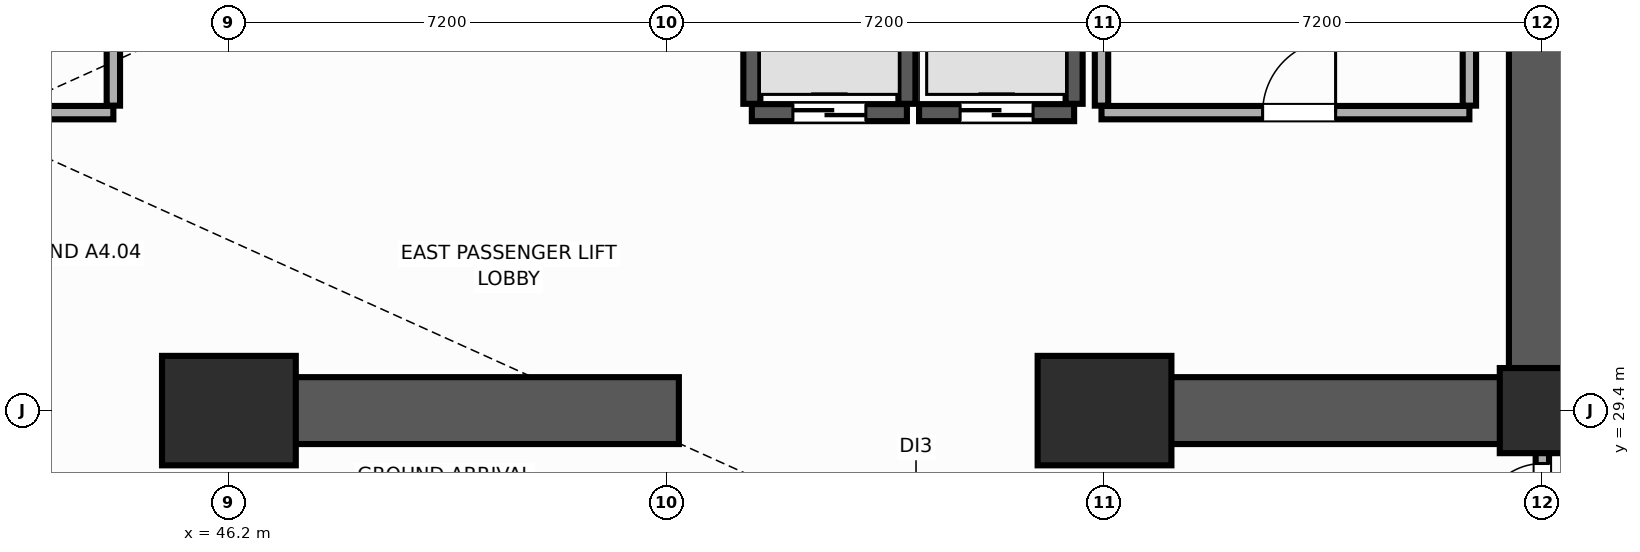
"""IFC4 building model, lengths in metres.
Left out: names, types, materials, properties, quantities, classifications, styles, units other than length and angle.
Written with IfcOpenShell. Run it as: python <this file> out.ifc"""

import sys

from ifc_helpers import new_model, si_unit, direction, frame, frame_2d, origin, origin_2d, place, context, subcontext, project, spatial, rectangle, extrude, element, fill, save


model = new_model("IFC4")
c1 = context("Model", 3, precision=1e-05, world=origin(), true_north=direction((0.0, 1.0)))
c2 = subcontext(c1, "Body", "Model", "MODEL_VIEW")
j1 = project(units=[si_unit("LENGTHUNIT", "METRE"), si_unit("PLANEANGLEUNIT", "RADIAN")], contexts=[c1])
p1 = place(None, origin())
s1 = spatial("IfcSite", under=j1, at=p1, CompositionType="ELEMENT")
p2 = place(p1, origin())
s2 = spatial("IfcBuilding", under=s1, at=p2, CompositionType="ELEMENT")
p3 = place(p2, origin())
s3 = spatial("IfcBuildingStorey", under=s2, at=p3, CompositionType="ELEMENT", Elevation=0.0)
for number, where, z_axis, x_axis in (
    (1, (46.2, 29.4, 0.0), (0.0, 0.0, 1.0), (1.0, 0.0, 0.0)),
    (2, (60.6, 29.4, 0.0), (0.0, 0.0, 1.0), (1.0, 0.0, 0.0)),
):
    element("IfcColumn", number, at=place(p3, frame(where, z_axis=z_axis, x_axis=x_axis)), inside=s3, PredefinedType="USERDEFINED", context=c2, shape_type="SweptSolid", body=[
        extrude(rectangle(XDim=2.2, YDim=1.8, at=origin_2d()), origin(), (0.0, 0.0, 1.0), 7.68),
    ])
p4 = place(p3, frame((67.8, 29.4, 0.0), z_axis=(0.0, 0.0, 1.0), x_axis=(1.0, 0.0, 0.0)))
e3 = element("IfcColumn", 3, at=p4, inside=s3, PredefinedType="COLUMN", context=c2, shape_type="SweptSolid", body=[
    extrude(rectangle(XDim=1.4, YDim=1.4, at=origin_2d()), origin(), (0.0, 0.0, 1.0), 7.68),
])
p5 = place(p3, frame((67.8, 29.4, 0.0), z_axis=(0.0, 0.0, 1.0), x_axis=(0.0, 1.0, 0.0)))
e4 = element("IfcWall", 4, at=p5, inside=s3, PredefinedType="SHEAR", context=c2, shape_type="SweptSolid", body=[
    extrude(rectangle(XDim=19.2, YDim=1.1, at=frame_2d((9.6, 0.0))), origin(), (0.0, 0.0, 1.0), 7.68),
])
p6 = place(p3, frame((46.0, 29.4, 0.0), z_axis=(0.0, 0.0, 1.0), x_axis=(1.0, 0.0, 0.0)))
e5 = element("IfcWall", 5, at=p6, inside=s3, PredefinedType="SHEAR", context=c2, shape_type="SweptSolid", body=[
    extrude(rectangle(XDim=7.6, YDim=1.1, at=frame_2d((3.8, 0.0))), origin(), (0.0, 0.0, 1.0), 7.68),
])
p7 = place(p3, frame((60.4, 29.4, 0.0), z_axis=(0.0, 0.0, 1.0), x_axis=(1.0, 0.0, 0.0)))
e6 = element("IfcWall", 6, at=p7, inside=s3, PredefinedType="SHEAR", context=c2, shape_type="SweptSolid", body=[
    extrude(rectangle(XDim=6.845, YDim=1.1, at=frame_2d((3.423, 0.0))), origin(), (0.0, 0.0, 1.0), 7.68),
])
p8 = place(p3, frame((54.8, 34.3, 0.0), z_axis=(0.0, 0.0, 1.0), x_axis=(1.0, 0.0, 0.0)))
e7 = element("IfcWall", 7, at=p8, inside=s3, PredefinedType="SHEAR", context=c2, shape_type="SweptSolid", body=[
    extrude(rectangle(XDim=2.55, YDim=0.28, at=frame_2d((1.275, 0.0))), origin(), (0.0, 0.0, 1.0), 7.68),
])
p9 = place(p8, frame((0.675, 0.0, 0.0)))
e8 = element("IfcOpeningElement", 8, at=p9, cuts=e7, PredefinedType="OPENING", context=c2, shape_type="SweptSolid", body=[
    extrude(rectangle(XDim=1.2, YDim=2.25, at=frame_2d((0.6, 1.125))), frame((0.0, 0.15, 0.0), z_axis=(0.0, -1.0, 0.0), x_axis=(1.0, 0.0, 0.0)), (0.0, 0.0, 1.0), 0.3),
])
for number, where, z_axis, x_axis in (
    (9, (54.8, 34.445, 0.0), (0.0, 0.0, 1.0), (0.0, 1.0, 0.0)),
    (10, (57.35, 34.445, 0.0), (0.0, 0.0, 1.0), (0.0, 1.0, 0.0)),
):
    element("IfcWall", number, at=place(p3, frame(where, z_axis=z_axis, x_axis=x_axis)), inside=s3, PredefinedType="SHEAR", context=c2, shape_type="SweptSolid", body=[
        extrude(rectangle(XDim=2.11, YDim=0.28, at=frame_2d((1.055, 0.0))), origin(), (0.0, 0.0, 1.0), 7.68),
    ])
p10 = place(p3, frame((57.55, 34.3, 0.0), z_axis=(0.0, 0.0, 1.0), x_axis=(1.0, 0.0, 0.0)))
e11 = element("IfcWall", 11, at=p10, inside=s3, PredefinedType="SHEAR", context=c2, shape_type="SweptSolid", body=[
    extrude(rectangle(XDim=2.55, YDim=0.28, at=frame_2d((1.275, 0.0))), origin(), (0.0, 0.0, 1.0), 7.68),
])
p11 = place(p10, frame((0.675, 0.0, 0.0)))
e12 = element("IfcOpeningElement", 12, at=p11, cuts=e11, PredefinedType="OPENING", context=c2, shape_type="SweptSolid", body=[
    extrude(rectangle(XDim=1.2, YDim=2.25, at=frame_2d((0.6, 1.125))), frame((0.0, 0.15, 0.0), z_axis=(0.0, -1.0, 0.0), x_axis=(1.0, 0.0, 0.0)), (0.0, 0.0, 1.0), 0.3),
])
p12 = place(p3, frame((60.1, 34.445, 0.0), z_axis=(0.0, 0.0, 1.0), x_axis=(0.0, 1.0, 0.0)))
e13 = element("IfcWall", 13, at=p12, inside=s3, PredefinedType="SHEAR", context=c2, shape_type="SweptSolid", body=[
    extrude(rectangle(XDim=2.11, YDim=0.28, at=frame_2d((1.055, 0.0))), origin(), (0.0, 0.0, 1.0), 7.68),
])
p13 = place(p3, frame((60.55, 34.3, 0.0), z_axis=(0.0, 0.0, 1.0), x_axis=(1.0, 0.0, 0.0)))
e14 = element("IfcWall", 14, at=p13, inside=s3, PredefinedType="PARTITIONING", context=c2, shape_type="SweptSolid", body=[
    extrude(rectangle(XDim=6.05, YDim=0.22, at=frame_2d((3.025, 0.0))), origin(), (0.0, 0.0, 1.0), 7.68),
])
p14 = place(p13, frame((2.65, 0.0, 0.0)))
e15 = element("IfcOpeningElement", 15, at=p14, cuts=e14, PredefinedType="OPENING", context=c2, shape_type="SweptSolid", body=[
    extrude(rectangle(XDim=1.2, YDim=2.15, at=frame_2d((0.6, 1.075))), frame((0.0, 0.12, 0.0), z_axis=(0.0, -1.0, 0.0), x_axis=(1.0, 0.0, 0.0)), (0.0, 0.0, 1.0), 0.24),
])
p15 = place(p3, frame((60.55, 34.415, 0.0), z_axis=(0.0, 0.0, 1.0), x_axis=(0.0, 1.0, 0.0)))
e16 = element("IfcWall", 16, at=p15, inside=s3, PredefinedType="PARTITIONING", context=c2, shape_type="SweptSolid", body=[
    extrude(rectangle(XDim=5.64, YDim=0.22, at=frame_2d((2.82, 0.0))), origin(), (0.0, 0.0, 1.0), 7.68),
])
p16 = place(p15, frame((3.435, 0.0, 0.0)))
e17 = element("IfcOpeningElement", 17, at=p16, cuts=e16, PredefinedType="OPENING", context=c2, shape_type="SweptSolid", body=[
    extrude(rectangle(XDim=1.2, YDim=2.15, at=frame_2d((0.6, 1.075))), frame((0.0, 0.12, 0.0), z_axis=(0.0, -1.0, 0.0), x_axis=(1.0, 0.0, 0.0)), (0.0, 0.0, 1.0), 0.24),
])
p17 = place(p3, frame((66.6, 34.415, 0.0), z_axis=(0.0, 0.0, 1.0), x_axis=(0.0, 1.0, 0.0)))
e18 = element("IfcWall", 18, at=p17, inside=s3, PredefinedType="PARTITIONING", context=c2, shape_type="SweptSolid", body=[
    extrude(rectangle(XDim=5.43, YDim=0.22, at=frame_2d((2.715, 0.0))), origin(), (0.0, 0.0, 1.0), 7.68),
])
p18 = place(p3, frame((39.7, 34.3, 0.0), z_axis=(0.0, 0.0, 1.0), x_axis=(1.0, 0.0, 0.0)))
e19 = element("IfcWall", 19, at=p18, inside=s3, PredefinedType="PARTITIONING", context=c2, shape_type="SweptSolid", body=[
    extrude(rectangle(XDim=4.6, YDim=0.22, at=frame_2d((2.3, 0.0))), origin(), (0.0, 0.0, 1.0), 7.68),
])
p19 = place(p18, frame((1.7, 0.0, 0.0)))
e20 = element("IfcOpeningElement", 20, at=p19, cuts=e19, PredefinedType="OPENING", context=c2, shape_type="SweptSolid", body=[
    extrude(rectangle(XDim=1.2, YDim=2.15, at=frame_2d((0.6, 1.075))), frame((0.0, 0.12, 0.0), z_axis=(0.0, -1.0, 0.0), x_axis=(1.0, 0.0, 0.0)), (0.0, 0.0, 1.0), 0.24),
])
p20 = place(p3, frame((44.3, 34.415, 0.0), z_axis=(0.0, 0.0, 1.0), x_axis=(0.0, 1.0, 0.0)))
e21 = element("IfcWall", 21, at=p20, inside=s3, PredefinedType="PARTITIONING", context=c2, shape_type="SweptSolid", body=[
    extrude(rectangle(XDim=5.785, YDim=0.22, at=frame_2d((2.893, 0.0))), origin(), (0.0, 0.0, 1.0), 7.68),
])
p21 = place(p3, frame((67.8, 26.88, 0.0), z_axis=(0.0, 0.0, 1.0), x_axis=(0.0, 1.0, 0.0)))
e22 = element("IfcWall", 22, at=p21, inside=s3, PredefinedType="PARTITIONING", context=c2, shape_type="SweptSolid", body=[
    extrude(rectangle(XDim=2.51, YDim=0.22, at=frame_2d((1.255, 0.0))), origin(), (0.0, 0.0, 1.0), 7.68),
])
p22 = place(p21, frame((0.65, 0.0, 0.0)))
e23 = element("IfcOpeningElement", 23, at=p22, cuts=e22, PredefinedType="OPENING", context=c2, shape_type="SweptSolid", body=[
    extrude(rectangle(XDim=1.0, YDim=2.15, at=frame_2d((0.5, 1.075))), frame((0.0, 0.12, 0.0), z_axis=(0.0, -1.0, 0.0), x_axis=(1.0, 0.0, 0.0)), (0.0, 0.0, 1.0), 0.24),
])
p23 = place(p9, origin())
e24 = element("IfcDoor", 24, at=p23, inside=s3, OperationType="DOUBLE_DOOR_SLIDING", PredefinedType="DOOR", context=c2, shape_type="SweptSolid", body=[
    extrude(rectangle(XDim=1.2, YDim=2.25, at=frame_2d((0.6, 1.125))), frame((0.0, 0.025, 0.0), z_axis=(0.0, -1.0, 0.0), x_axis=(1.0, 0.0, 0.0)), (0.0, 0.0, 1.0), 0.05),
])
fill(e8, e24)
p24 = place(p11, origin())
e25 = element("IfcDoor", 25, at=p24, inside=s3, OperationType="DOUBLE_DOOR_SLIDING", PredefinedType="DOOR", context=c2, shape_type="SweptSolid", body=[
    extrude(rectangle(XDim=1.2, YDim=2.25, at=frame_2d((0.6, 1.125))), frame((0.0, 0.025, 0.0), z_axis=(0.0, -1.0, 0.0), x_axis=(1.0, 0.0, 0.0)), (0.0, 0.0, 1.0), 0.05),
])
fill(e12, e25)
p25 = place(p14, origin())
e26 = element("IfcDoor", 26, at=p25, inside=s3, OperationType="SINGLE_SWING_RIGHT", PredefinedType="DOOR", context=c2, shape_type="SweptSolid", body=[
    extrude(rectangle(XDim=1.2, YDim=2.15, at=frame_2d((0.6, 1.075))), frame((0.0, 0.025, 0.0), z_axis=(0.0, -1.0, 0.0), x_axis=(1.0, 0.0, 0.0)), (0.0, 0.0, 1.0), 0.05),
])
fill(e15, e26)
p26 = place(p22, origin())
e27 = element("IfcDoor", 27, at=p26, inside=s3, OperationType="SINGLE_SWING_LEFT", PredefinedType="DOOR", context=c2, shape_type="SweptSolid", body=[
    extrude(rectangle(XDim=1.0, YDim=2.15, at=frame_2d((0.5, 1.075))), frame((0.0, 0.025, 0.0), z_axis=(0.0, -1.0, 0.0), x_axis=(1.0, 0.0, 0.0)), (0.0, 0.0, 1.0), 0.05),
])
fill(e23, e27)
save(model, sys.argv[1])
